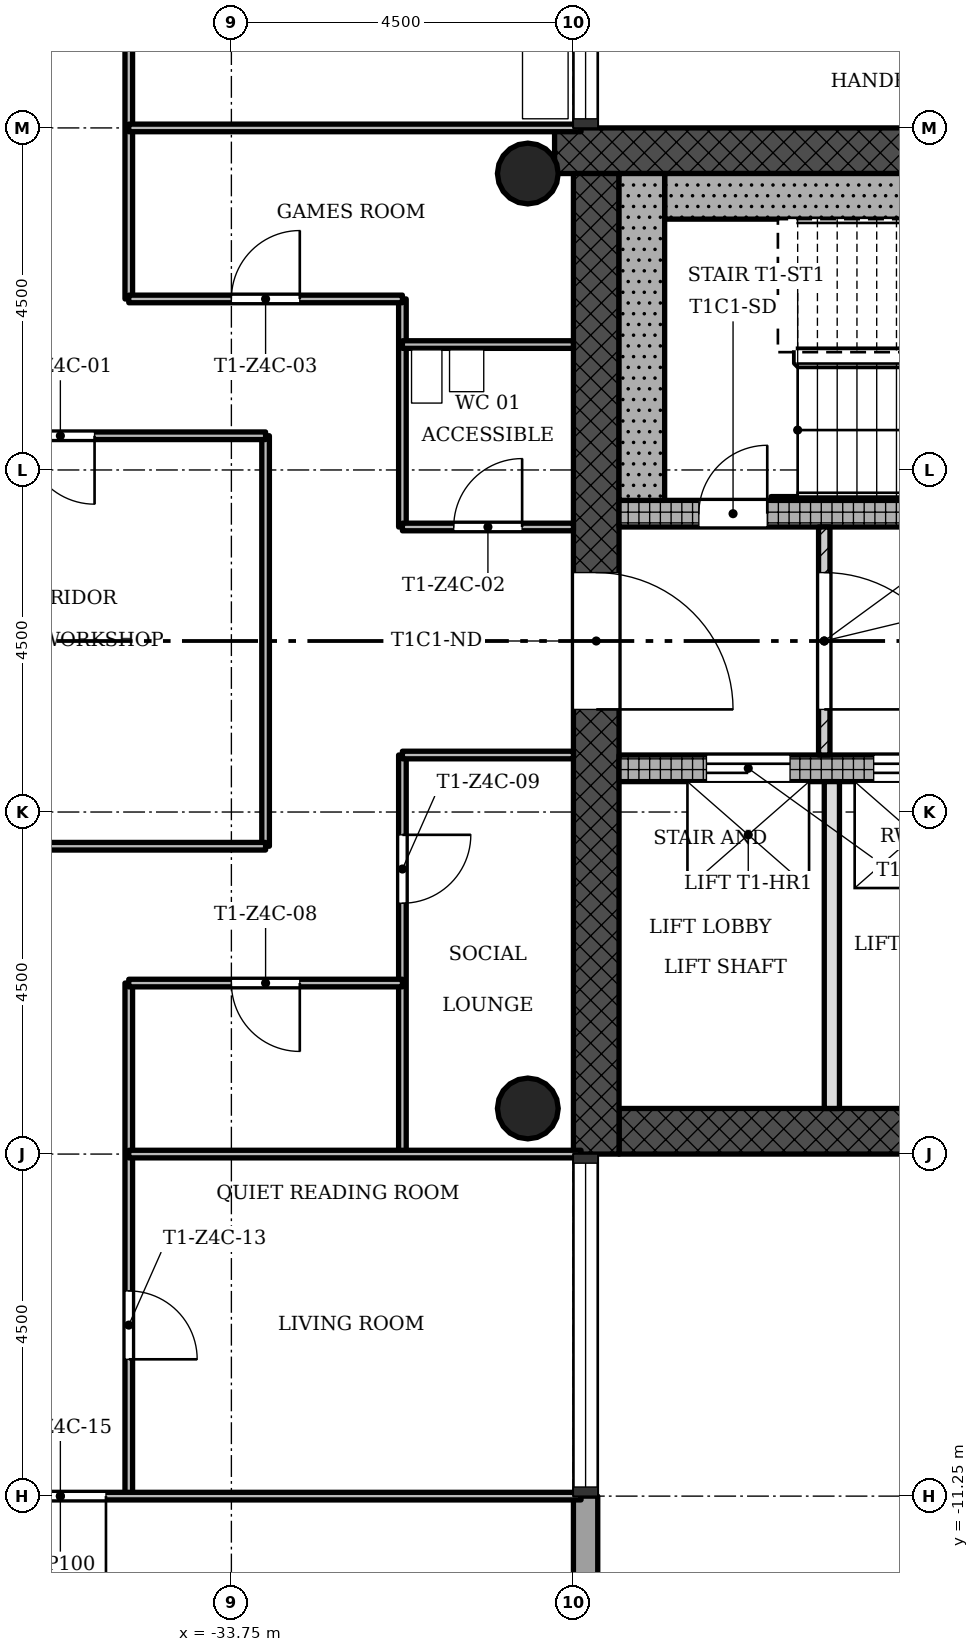
"""IFC4 building model, lengths in metres.
Left out: names, types, materials, properties, quantities, classifications, styles, units other than length and angle.
Written with IfcOpenShell. Run it as: python <this file> out.ifc"""

import sys

from ifc_helpers import new_model, si_unit, direction, frame, frame_2d, origin, origin_2d, place, context, subcontext, project, spatial, rectangle, hollow_circle, extrude, element, fill, save


model = new_model("IFC4")
c1 = context("Model", 3, precision=1e-05, world=origin(), true_north=direction((0.0, 1.0)))
c2 = subcontext(c1, "Body", "Model", "MODEL_VIEW")
j1 = project(units=[si_unit("LENGTHUNIT", "METRE"), si_unit("PLANEANGLEUNIT", "RADIAN")], contexts=[c1])
p1 = place(None, origin())
s1 = spatial("IfcSite", under=j1, at=p1, CompositionType="ELEMENT")
p2 = place(p1, origin())
s2 = spatial("IfcBuilding", under=s1, at=p2, CompositionType="ELEMENT")
p3 = place(p2, frame((0.0, 0.0, 189.2)))
s3 = spatial("IfcBuildingStorey", under=s2, at=p3, CompositionType="ELEMENT", Elevation=189.2)
p4 = place(p3, frame((-28.65, -6.45, 0.0), z_axis=(0.0, 0.0, 1.0), x_axis=(1.0, 0.0, 0.0)))
e1 = element("IfcWall", 1, at=p4, inside=s3, PredefinedType="SHEAR", context=c2, shape_type="SweptSolid", body=[
    extrude(rectangle(XDim=8.4, YDim=0.6, at=frame_2d((4.2, 0.0))), origin(), (0.0, 0.0, 1.0), 3.4),
])
p5 = place(p3, frame((-20.602, 6.45, 0.0), z_axis=(0.0, 0.0, 1.0), x_axis=(-1.0, 0.0, 0.0)))
e2 = element("IfcWall", 2, at=p5, inside=s3, PredefinedType="SHEAR", context=c2, shape_type="SweptSolid", body=[
    extrude(rectangle(XDim=8.896, YDim=0.6, at=frame_2d((4.448, 0.0))), origin(), (0.0, 0.0, 1.0), 3.4),
])
p6 = place(p3, frame((-28.95, 6.15, 0.0), z_axis=(0.0, 0.0, 1.0), x_axis=(0.0, -1.0, 0.0)))
e3 = element("IfcWall", 3, at=p6, inside=s3, PredefinedType="SHEAR", context=c2, shape_type="SweptSolid", body=[
    extrude(rectangle(XDim=12.9, YDim=0.6, at=frame_2d((6.45, 0.0))), origin(), (0.0, 0.0, 1.0), 3.4),
])
p7 = place(p6, frame((5.25, 0.0, 0.0)))
e4 = element("IfcOpeningElement", 4, at=p7, cuts=e3, PredefinedType="OPENING", context=c2, shape_type="SweptSolid", body=[
    extrude(rectangle(XDim=1.8, YDim=2.1, at=frame_2d((0.9, 1.05))), frame((0.0, 0.31, 0.0), z_axis=(0.0, -1.0, 0.0), x_axis=(1.0, 0.0, 0.0)), (0.0, 0.0, 1.0), 0.62),
])
p8 = place(p3, frame((-28.65, -1.675, 0.0), z_axis=(0.0, 0.0, 1.0), x_axis=(1.0, 0.0, 0.0)))
e5 = element("IfcWall", 5, at=p8, inside=s3, PredefinedType="SHEAR", context=c2, shape_type="SweptSolid", body=[
    extrude(rectangle(XDim=7.8, YDim=0.35, at=frame_2d((3.9, 0.0))), origin(), (0.0, 0.0, 1.0), 3.4),
])
p9 = place(p8, frame((1.15, 0.0, 0.0)))
e6 = element("IfcOpeningElement", 6, at=p9, cuts=e5, PredefinedType="OPENING", context=c2, shape_type="SweptSolid", body=[
    extrude(rectangle(XDim=1.1, YDim=2.1, at=frame_2d((0.55, 1.05))), frame((0.0, 0.185, 0.0), z_axis=(0.0, -1.0, 0.0), x_axis=(1.0, 0.0, 0.0)), (0.0, 0.0, 1.0), 0.37),
])
p10 = place(p8, frame((3.35, 0.0, 0.0)))
e7 = element("IfcOpeningElement", 7, at=p10, cuts=e5, PredefinedType="OPENING", context=c2, shape_type="SweptSolid", body=[
    extrude(rectangle(XDim=1.1, YDim=2.1, at=frame_2d((0.55, 1.05))), frame((0.0, 0.185, 0.0), z_axis=(0.0, -1.0, 0.0), x_axis=(1.0, 0.0, 0.0)), (0.0, 0.0, 1.0), 0.37),
])
p11 = place(p8, frame((5.55, 0.0, 0.0)))
e8 = element("IfcOpeningElement", 8, at=p11, cuts=e5, PredefinedType="OPENING", context=c2, shape_type="SweptSolid", body=[
    extrude(rectangle(XDim=1.1, YDim=2.1, at=frame_2d((0.55, 1.05))), frame((0.0, 0.185, 0.0), z_axis=(0.0, -1.0, 0.0), x_axis=(1.0, 0.0, 0.0)), (0.0, 0.0, 1.0), 0.37),
])
p12 = place(p3, frame((-28.65, 1.675, 0.0), z_axis=(0.0, 0.0, 1.0), x_axis=(1.0, 0.0, 0.0)))
e9 = element("IfcWall", 9, at=p12, inside=s3, PredefinedType="SHEAR", context=c2, shape_type="SweptSolid", body=[
    extrude(rectangle(XDim=7.8, YDim=0.35, at=frame_2d((3.9, 0.0))), origin(), (0.0, 0.0, 1.0), 3.4),
])
p13 = place(p12, frame((1.05, 0.0, 0.0)))
e10 = element("IfcOpeningElement", 10, at=p13, cuts=e9, PredefinedType="OPENING", context=c2, shape_type="SweptSolid", body=[
    extrude(rectangle(XDim=0.9, YDim=2.1, at=frame_2d((0.45, 1.05))), frame((0.0, 0.185, 0.0), z_axis=(0.0, -1.0, 0.0), x_axis=(1.0, 0.0, 0.0)), (0.0, 0.0, 1.0), 0.37),
])
for number, where, z_axis, x_axis in (
    (11, (-29.85, -6.15, 0.0), (0.0, 0.0, 1.0), (1.0, 0.0, 0.0)),
    (12, (-29.85, 6.15, 0.0), (0.0, 0.0, 1.0), (1.0, 0.0, 0.0)),
):
    element("IfcColumn", number, at=place(p3, frame(where, z_axis=z_axis, x_axis=x_axis)), inside=s3, PredefinedType="COLUMN", context=c2, shape_type="SweptSolid", body=[
        extrude(hollow_circle(Radius=0.4, WallThickness=0.028, at=origin_2d()), origin(), (0.0, 0.0, 1.0), 3.4),
    ])
p14 = place(p3, frame((-29.09, -12.75, -0.3), z_axis=(0.0, 0.0, 1.0), x_axis=(0.0, 1.0, 0.0)))
e13 = element("IfcWall", 13, at=p14, inside=s3, PredefinedType="STANDARD", context=c2, shape_type="SweptSolid", body=[
    extrude(rectangle(XDim=1.5, YDim=0.32, at=frame_2d((0.75, 0.0))), origin(), (0.0, 0.0, 1.0), 3.4),
])
p15 = place(p3, frame((-25.95, -1.5, 0.0), z_axis=(0.0, 0.0, 1.0), x_axis=(0.0, 1.0, 0.0)))
e14 = element("IfcWall", 14, at=p15, inside=s3, PredefinedType="PARTITIONING", context=c2, shape_type="SweptSolid", body=[
    extrude(rectangle(XDim=3.0, YDim=0.15, at=frame_2d((1.5, 0.0))), origin(), (0.0, 0.0, 1.0), 3.0),
])
p16 = place(p15, frame((0.6, 0.0, 0.0)))
e15 = element("IfcOpeningElement", 15, at=p16, cuts=e14, PredefinedType="OPENING", context=c2, shape_type="SweptSolid", body=[
    extrude(rectangle(XDim=1.8, YDim=2.1, at=frame_2d((0.9, 1.05))), frame((0.0, 0.085, 0.0), z_axis=(0.0, -1.0, 0.0), x_axis=(1.0, 0.0, 0.0)), (0.0, 0.0, 1.0), 0.17),
])
p17 = place(p3, frame((-25.85, -6.15, 0.0), z_axis=(0.0, 0.0, 1.0), x_axis=(0.0, 1.0, 0.0)))
e16 = element("IfcWall", 16, at=p17, inside=s3, PredefinedType="SOLIDWALL", context=c2, shape_type="SweptSolid", body=[
    extrude(rectangle(XDim=4.3, YDim=0.2, at=frame_2d((2.15, 0.0))), origin(), (0.0, 0.0, 1.0), 3.0),
])
p18 = place(p3, frame((-35.1, -11.25, 0.0), z_axis=(0.0, 0.0, 1.0), x_axis=(0.0, 1.0, 0.0)))
e17 = element("IfcWall", 17, at=p18, inside=s3, PredefinedType="PARTITIONING", context=c2, shape_type="SweptSolid", body=[
    extrude(rectangle(XDim=6.75, YDim=0.1, at=frame_2d((3.375, 0.0))), origin(), (0.0, 0.0, 1.0), 3.0),
])
p19 = place(p18, frame((1.8, 0.0, 0.0)))
e18 = element("IfcOpeningElement", 18, at=p19, cuts=e17, PredefinedType="OPENING", context=c2, shape_type="SweptSolid", body=[
    extrude(rectangle(XDim=0.9, YDim=2.1, at=frame_2d((0.45, 1.05))), frame((0.0, 0.06, 0.0), z_axis=(0.0, -1.0, 0.0), x_axis=(1.0, 0.0, 0.0)), (0.0, 0.0, 1.0), 0.12),
])
p20 = place(p3, frame((-35.1, 4.5, 0.0), z_axis=(0.0, 0.0, 1.0), x_axis=(0.0, 1.0, 0.0)))
e19 = element("IfcWall", 19, at=p20, inside=s3, PredefinedType="PARTITIONING", context=c2, shape_type="SweptSolid", body=[
    extrude(rectangle(XDim=4.05, YDim=0.1, at=frame_2d((2.025, 0.0))), origin(), (0.0, 0.0, 1.0), 3.0),
])
p21 = place(p3, frame((-33.3, -2.7, 0.0), z_axis=(0.0, 0.0, 1.0), x_axis=(0.0, 1.0, 0.0)))
e20 = element("IfcWall", 20, at=p21, inside=s3, PredefinedType="PARTITIONING", context=c2, shape_type="SweptSolid", body=[
    extrude(rectangle(XDim=5.4, YDim=0.1, at=frame_2d((2.7, 0.0))), origin(), (0.0, 0.0, 1.0), 3.0),
])
p22 = place(p3, frame((-31.5, -6.75, 0.0), z_axis=(0.0, 0.0, 1.0), x_axis=(0.0, 1.0, 0.0)))
e21 = element("IfcWall", 21, at=p22, inside=s3, PredefinedType="PARTITIONING", context=c2, shape_type="SweptSolid", body=[
    extrude(rectangle(XDim=5.25, YDim=0.1, at=frame_2d((2.625, 0.0))), origin(), (0.0, 0.0, 1.0), 3.0),
])
p23 = place(p22, frame((3.3, 0.0, 0.0)))
e22 = element("IfcOpeningElement", 22, at=p23, cuts=e21, PredefinedType="OPENING", context=c2, shape_type="SweptSolid", body=[
    extrude(rectangle(XDim=0.9, YDim=2.1, at=frame_2d((0.45, 1.05))), frame((0.0, 0.06, 0.0), z_axis=(0.0, -1.0, 0.0), x_axis=(1.0, 0.0, 0.0)), (0.0, 0.0, 1.0), 0.12),
])
p24 = place(p3, frame((-31.5, 1.5, 0.0), z_axis=(0.0, 0.0, 1.0), x_axis=(0.0, 1.0, 0.0)))
e23 = element("IfcWall", 23, at=p24, inside=s3, PredefinedType="PARTITIONING", context=c2, shape_type="SweptSolid", body=[
    extrude(rectangle(XDim=3.0, YDim=0.1, at=frame_2d((1.5, 0.0))), origin(), (0.0, 0.0, 1.0), 3.0),
])
p25 = place(p3, frame((-42.85, -11.25, 0.0), z_axis=(0.0, 0.0, 1.0), x_axis=(1.0, 0.0, 0.0)))
e24 = element("IfcWall", 24, at=p25, inside=s3, PredefinedType="PARTITIONING", context=c2, shape_type="SweptSolid", body=[
    extrude(rectangle(XDim=13.7, YDim=0.1, at=frame_2d((6.85, 0.0))), origin(), (0.0, 0.0, 1.0), 3.0),
])
p26 = place(p25, frame((6.25, 0.0, 0.0)))
e25 = element("IfcOpeningElement", 25, at=p26, cuts=e24, PredefinedType="OPENING", context=c2, shape_type="SweptSolid", body=[
    extrude(rectangle(XDim=1.2, YDim=2.1, at=frame_2d((0.6, 1.05))), frame((0.0, 0.06, 0.0), z_axis=(0.0, -1.0, 0.0), x_axis=(1.0, 0.0, 0.0)), (0.0, 0.0, 1.0), 0.12),
])
p27 = place(p3, frame((-35.1, -6.75, 0.0), z_axis=(0.0, 0.0, 1.0), x_axis=(1.0, 0.0, 0.0)))
e26 = element("IfcWall", 26, at=p27, inside=s3, PredefinedType="PARTITIONING", context=c2, shape_type="SweptSolid", body=[
    extrude(rectangle(XDim=5.95, YDim=0.1, at=frame_2d((2.975, 0.0))), origin(), (0.0, 0.0, 1.0), 3.0),
])
p28 = place(p3, frame((-35.1, -4.5, 0.0), z_axis=(0.0, 0.0, 1.0), x_axis=(1.0, 0.0, 0.0)))
e27 = element("IfcWall", 27, at=p28, inside=s3, PredefinedType="PARTITIONING", context=c2, shape_type="SweptSolid", body=[
    extrude(rectangle(XDim=3.6, YDim=0.1, at=frame_2d((1.8, 0.0))), origin(), (0.0, 0.0, 1.0), 3.0),
])
p29 = place(p28, frame((1.35, 0.0, 0.0)))
e28 = element("IfcOpeningElement", 28, at=p29, cuts=e27, PredefinedType="OPENING", context=c2, shape_type="SweptSolid", body=[
    extrude(rectangle(XDim=0.9, YDim=2.1, at=frame_2d((0.45, 1.05))), frame((0.0, 0.06, 0.0), z_axis=(0.0, -1.0, 0.0), x_axis=(1.0, 0.0, 0.0)), (0.0, 0.0, 1.0), 0.12),
])
p30 = place(p3, frame((-38.7, -2.7, 0.0), z_axis=(0.0, 0.0, 1.0), x_axis=(1.0, 0.0, 0.0)))
e29 = element("IfcWall", 29, at=p30, inside=s3, PredefinedType="PARTITIONING", context=c2, shape_type="SweptSolid", body=[
    extrude(rectangle(XDim=5.4, YDim=0.1, at=frame_2d((2.7, 0.0))), origin(), (0.0, 0.0, 1.0), 3.0),
])
p31 = place(p3, frame((-31.5, -1.5, 0.0), z_axis=(0.0, 0.0, 1.0), x_axis=(1.0, 0.0, 0.0)))
e30 = element("IfcWall", 30, at=p31, inside=s3, PredefinedType="PARTITIONING", context=c2, shape_type="SweptSolid", body=[
    extrude(rectangle(XDim=2.25, YDim=0.1, at=frame_2d((1.125, 0.0))), origin(), (0.0, 0.0, 1.0), 3.0),
])
p32 = place(p3, frame((-31.5, 1.5, 0.0), z_axis=(0.0, 0.0, 1.0), x_axis=(1.0, 0.0, 0.0)))
e31 = element("IfcWall", 31, at=p32, inside=s3, PredefinedType="PARTITIONING", context=c2, shape_type="SweptSolid", body=[
    extrude(rectangle(XDim=2.25, YDim=0.1, at=frame_2d((1.125, 0.0))), origin(), (0.0, 0.0, 1.0), 3.0),
])
p33 = place(p32, frame((0.675, 0.0, 0.0)))
e32 = element("IfcOpeningElement", 32, at=p33, cuts=e31, PredefinedType="OPENING", context=c2, shape_type="SweptSolid", body=[
    extrude(rectangle(XDim=0.9, YDim=2.1, at=frame_2d((0.45, 1.05))), frame((0.0, 0.06, 0.0), z_axis=(0.0, -1.0, 0.0), x_axis=(1.0, 0.0, 0.0)), (0.0, 0.0, 1.0), 0.12),
])
p34 = place(p3, frame((-38.7, 2.7, 0.0), z_axis=(0.0, 0.0, 1.0), x_axis=(1.0, 0.0, 0.0)))
e33 = element("IfcWall", 33, at=p34, inside=s3, PredefinedType="PARTITIONING", context=c2, shape_type="SweptSolid", body=[
    extrude(rectangle(XDim=5.4, YDim=0.1, at=frame_2d((2.7, 0.0))), origin(), (0.0, 0.0, 1.0), 3.0),
])
p35 = place(p34, frame((2.25, 0.0, 0.0)))
e34 = element("IfcOpeningElement", 34, at=p35, cuts=e33, PredefinedType="OPENING", context=c2, shape_type="SweptSolid", body=[
    extrude(rectangle(XDim=0.9, YDim=2.1, at=frame_2d((0.45, 1.05))), frame((0.0, 0.06, 0.0), z_axis=(0.0, -1.0, 0.0), x_axis=(1.0, 0.0, 0.0)), (0.0, 0.0, 1.0), 0.12),
])
p36 = place(p3, frame((-31.5, 3.9, 0.0), z_axis=(0.0, 0.0, 1.0), x_axis=(1.0, 0.0, 0.0)))
e35 = element("IfcWall", 35, at=p36, inside=s3, PredefinedType="PARTITIONING", context=c2, shape_type="SweptSolid", body=[
    extrude(rectangle(XDim=2.25, YDim=0.1, at=frame_2d((1.125, 0.0))), origin(), (0.0, 0.0, 1.0), 3.0),
])
p37 = place(p3, frame((-35.1, 4.5, 0.0), z_axis=(0.0, 0.0, 1.0), x_axis=(1.0, 0.0, 0.0)))
e36 = element("IfcWall", 36, at=p37, inside=s3, PredefinedType="PARTITIONING", context=c2, shape_type="SweptSolid", body=[
    extrude(rectangle(XDim=3.6, YDim=0.1, at=frame_2d((1.8, 0.0))), origin(), (0.0, 0.0, 1.0), 3.0),
])
p38 = place(p37, frame((1.35, 0.0, 0.0)))
e37 = element("IfcOpeningElement", 37, at=p38, cuts=e36, PredefinedType="OPENING", context=c2, shape_type="SweptSolid", body=[
    extrude(rectangle(XDim=0.9, YDim=2.1, at=frame_2d((0.45, 1.05))), frame((0.0, 0.06, 0.0), z_axis=(0.0, -1.0, 0.0), x_axis=(1.0, 0.0, 0.0)), (0.0, 0.0, 1.0), 0.12),
])
p39 = place(p3, frame((-35.1, 6.75, 0.0), z_axis=(0.0, 0.0, 1.0), x_axis=(1.0, 0.0, 0.0)))
e38 = element("IfcWall", 38, at=p39, inside=s3, PredefinedType="PARTITIONING", context=c2, shape_type="SweptSolid", body=[
    extrude(rectangle(XDim=5.95, YDim=0.1, at=frame_2d((2.975, 0.0))), origin(), (0.0, 0.0, 1.0), 3.0),
])
p40 = place(p3, frame((-28.05, 5.85, 0.0), z_axis=(0.0, 0.0, 1.0), x_axis=(1.0, 0.0, 0.0)))
e39 = element("IfcWall", 39, at=p40, inside=s3, PredefinedType="SHEAR", context=c2, shape_type="SweptSolid", body=[
    extrude(rectangle(XDim=6.6, YDim=0.6, at=frame_2d((3.3, 0.0))), origin(), (0.0, 0.0, 1.0), 3.4),
])
p41 = place(p3, frame((-28.35, 1.85, 0.0), z_axis=(0.0, 0.0, 1.0), x_axis=(0.0, 1.0, 0.0)))
e40 = element("IfcWall", 40, at=p41, inside=s3, PredefinedType="SHEAR", context=c2, shape_type="SweptSolid", body=[
    extrude(rectangle(XDim=4.3, YDim=0.6, at=frame_2d((2.15, 0.0))), origin(), (0.0, 0.0, 1.0), 3.4),
])
p42 = place(p3, frame((-26.65, 1.875, 0.0), z_axis=(0.0, 0.0, 1.0), x_axis=(1.0, 0.0, 0.0)))
e41 = element("IfcWall", 41, at=p42, inside=s3, PredefinedType="SHEAR", context=c2, shape_type="SweptSolid", body=[
    extrude(rectangle(XDim=5.2, YDim=0.05, at=frame_2d((2.6, 0.0))), origin(), (0.0, 0.0, 1.0), 3.4),
])
p43 = place(p16, origin())
e42 = element("IfcDoor", 42, at=p43, inside=s3, OperationType="SINGLE_SWING_LEFT", PredefinedType="DOOR", context=c2, shape_type="SweptSolid", body=[
    extrude(rectangle(XDim=1.8, YDim=2.1, at=frame_2d((0.9, 1.05))), frame((0.0, 0.025, 0.0), z_axis=(0.0, -1.0, 0.0), x_axis=(1.0, 0.0, 0.0)), (0.0, 0.0, 1.0), 0.05),
])
fill(e15, e42)
p44 = place(p35, origin())
e43 = element("IfcDoor", 43, at=p44, inside=s3, OperationType="SINGLE_SWING_RIGHT", PredefinedType="DOOR", context=c2, shape_type="SweptSolid", body=[
    extrude(rectangle(XDim=0.9, YDim=2.1, at=frame_2d((0.45, 1.05))), frame((0.0, 0.025, 0.0), z_axis=(0.0, -1.0, 0.0), x_axis=(1.0, 0.0, 0.0)), (0.0, 0.0, 1.0), 0.05),
])
fill(e34, e43)
p45 = place(p33, origin())
e44 = element("IfcDoor", 44, at=p45, inside=s3, OperationType="SINGLE_SWING_LEFT", PredefinedType="DOOR", context=c2, shape_type="SweptSolid", body=[
    extrude(rectangle(XDim=0.9, YDim=2.1, at=frame_2d((0.45, 1.05))), frame((0.0, 0.025, 0.0), z_axis=(0.0, -1.0, 0.0), x_axis=(1.0, 0.0, 0.0)), (0.0, 0.0, 1.0), 0.05),
])
fill(e32, e44)
p46 = place(p38, origin())
e45 = element("IfcDoor", 45, at=p46, inside=s3, OperationType="SINGLE_SWING_LEFT", PredefinedType="DOOR", context=c2, shape_type="SweptSolid", body=[
    extrude(rectangle(XDim=0.9, YDim=2.1, at=frame_2d((0.45, 1.05))), frame((0.0, 0.025, 0.0), z_axis=(0.0, -1.0, 0.0), x_axis=(1.0, 0.0, 0.0)), (0.0, 0.0, 1.0), 0.05),
])
fill(e37, e45)
p47 = place(p29, origin())
e46 = element("IfcDoor", 46, at=p47, inside=s3, OperationType="SINGLE_SWING_RIGHT", PredefinedType="DOOR", context=c2, shape_type="SweptSolid", body=[
    extrude(rectangle(XDim=0.9, YDim=2.1, at=frame_2d((0.45, 1.05))), frame((0.0, 0.025, 0.0), z_axis=(0.0, -1.0, 0.0), x_axis=(1.0, 0.0, 0.0)), (0.0, 0.0, 1.0), 0.05),
])
fill(e28, e46)
p48 = place(p23, origin())
e47 = element("IfcDoor", 47, at=p48, inside=s3, OperationType="SINGLE_SWING_RIGHT", PredefinedType="DOOR", context=c2, shape_type="SweptSolid", body=[
    extrude(rectangle(XDim=0.9, YDim=2.1, at=frame_2d((0.45, 1.05))), frame((0.0, 0.025, 0.0), z_axis=(0.0, -1.0, 0.0), x_axis=(1.0, 0.0, 0.0)), (0.0, 0.0, 1.0), 0.05),
])
fill(e22, e47)
p49 = place(p19, origin())
e48 = element("IfcDoor", 48, at=p49, inside=s3, OperationType="SINGLE_SWING_LEFT", PredefinedType="DOOR", context=c2, shape_type="SweptSolid", body=[
    extrude(rectangle(XDim=0.9, YDim=2.1, at=frame_2d((0.45, 1.05))), frame((0.0, 0.025, 0.0), z_axis=(0.0, -1.0, 0.0), x_axis=(1.0, 0.0, 0.0)), (0.0, 0.0, 1.0), 0.05),
])
fill(e18, e48)
p50 = place(p26, origin())
e49 = element("IfcDoor", 49, at=p50, inside=s3, OperationType="SINGLE_SWING_RIGHT", PredefinedType="DOOR", context=c2, shape_type="SweptSolid", body=[
    extrude(rectangle(XDim=1.2, YDim=2.1, at=frame_2d((0.6, 1.05))), frame((0.0, 0.025, 0.0), z_axis=(0.0, -1.0, 0.0), x_axis=(1.0, 0.0, 0.0)), (0.0, 0.0, 1.0), 0.05),
])
fill(e25, e49)
p51 = place(p13, origin())
e50 = element("IfcDoor", 50, at=p51, inside=s3, OperationType="SINGLE_SWING_LEFT", PredefinedType="DOOR", context=c2, shape_type="SweptSolid", body=[
    extrude(rectangle(XDim=0.9, YDim=2.1, at=frame_2d((0.45, 1.05))), frame((0.0, 0.025, 0.0), z_axis=(0.0, -1.0, 0.0), x_axis=(1.0, 0.0, 0.0)), (0.0, 0.0, 1.0), 0.05),
])
fill(e10, e50)
p52 = place(p9, origin())
e51 = element("IfcDoor", 51, at=p52, inside=s3, OperationType="SLIDING_TO_LEFT", PredefinedType="DOOR", context=c2, shape_type="SweptSolid", body=[
    extrude(rectangle(XDim=1.1, YDim=2.1, at=frame_2d((0.55, 1.05))), frame((0.0, 0.025, 0.0), z_axis=(0.0, -1.0, 0.0), x_axis=(1.0, 0.0, 0.0)), (0.0, 0.0, 1.0), 0.05),
])
fill(e6, e51)
p53 = place(p10, origin())
e52 = element("IfcDoor", 52, at=p53, inside=s3, OperationType="SLIDING_TO_LEFT", PredefinedType="DOOR", context=c2, shape_type="SweptSolid", body=[
    extrude(rectangle(XDim=1.1, YDim=2.1, at=frame_2d((0.55, 1.05))), frame((0.0, 0.025, 0.0), z_axis=(0.0, -1.0, 0.0), x_axis=(1.0, 0.0, 0.0)), (0.0, 0.0, 1.0), 0.05),
])
fill(e7, e52)
p54 = place(p7, origin())
e53 = element("IfcDoor", 53, at=p54, inside=s3, OperationType="SINGLE_SWING_LEFT", PredefinedType="DOOR", context=c2, shape_type="SweptSolid", body=[
    extrude(rectangle(XDim=1.8, YDim=2.1, at=frame_2d((0.9, 1.05))), frame((0.0, 0.025, 0.0), z_axis=(0.0, -1.0, 0.0), x_axis=(1.0, 0.0, 0.0)), (0.0, 0.0, 1.0), 0.05),
])
fill(e4, e53)
save(model, sys.argv[1])
